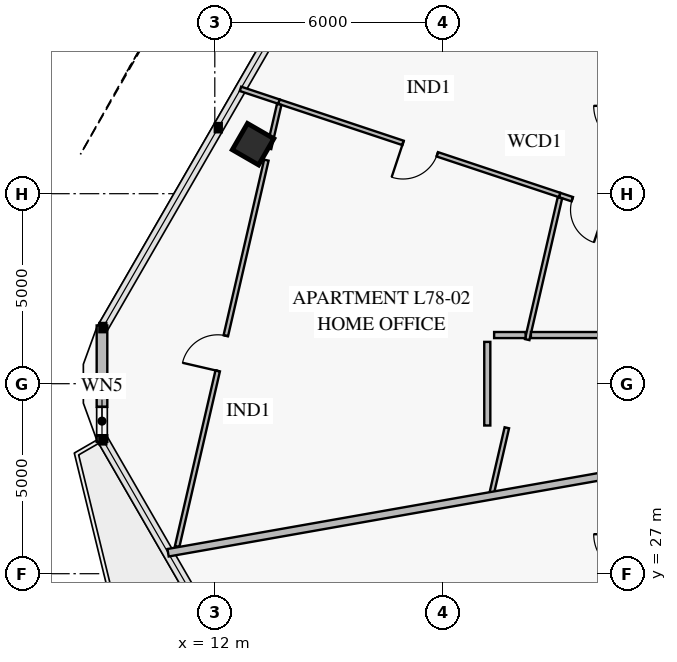
"""IFC4 building model, lengths in metres.
Left out: names, types, materials, properties, quantities, classifications, styles, units other than length and angle.
Written with IfcOpenShell. Run it as: python <this file> out.ifc"""

import sys

from ifc_helpers import new_model, si_unit, direction, frame, frame_2d, origin, origin_2d, place, context, subcontext, project, spatial, rectangle, extrude, element, fill, save


model = new_model("IFC4")
c1 = context("Model", 3, precision=1e-05, world=origin(), true_north=direction((0.0, 1.0)))
c2 = subcontext(c1, "Body", "Model", "MODEL_VIEW")
j1 = project(units=[si_unit("LENGTHUNIT", "METRE"), si_unit("PLANEANGLEUNIT", "RADIAN")], contexts=[c1])
p1 = place(None, origin())
s1 = spatial("IfcSite", under=j1, at=p1, CompositionType="ELEMENT")
p2 = place(p1, origin())
s2 = spatial("IfcBuilding", under=s1, at=p2, CompositionType="ELEMENT")
p3 = place(p2, frame((0.0, 0.0, 308.2)))
s3 = spatial("IfcBuildingStorey", under=s2, at=p3, CompositionType="ELEMENT", Elevation=308.2)
p4 = place(p3, frame((13.007, 38.302, 0.0), z_axis=(0.0, 0.0, 1.0), x_axis=(-0.5, -0.866025403784, 0.0)))
e1 = element("IfcColumn", 1, at=p4, inside=s3, PredefinedType="COLUMN", context=c2, shape_type="SweptSolid", body=[
    extrude(rectangle(XDim=0.8, YDim=0.8, at=origin_2d()), origin(), (0.0, 0.0, 1.0), 3.55),
])
p5 = place(p3, frame((9.031, 30.468, 0.0), z_axis=(0.0, 0.0, 1.0), x_axis=(0.0, 1.0, 0.0)))
e2 = element("IfcWall", 2, at=p5, inside=s3, PredefinedType="SOLIDWALL", context=c2, shape_type="SweptSolid", body=[
    extrude(rectangle(XDim=3.065, YDim=0.28, at=frame_2d((1.532, 0.0))), origin(), (0.0, 0.0, 1.0), 3.55),
])
p6 = place(p5, frame((0.173, 0.0, 0.85)))
e3 = element("IfcOpeningElement", 3, at=p6, cuts=e2, PredefinedType="OPENING", context=c2, shape_type="SweptSolid", body=[
    extrude(rectangle(XDim=0.75, YDim=1.5, at=frame_2d((0.375, 0.75))), frame((0.0, 0.152, 0.0), z_axis=(0.0, -1.0, 0.0), x_axis=(1.0, 0.0, 0.0)), (0.0, 0.0, 1.0), 0.304),
])
p7 = place(p3, frame((22.45, 36.508, 0.0), z_axis=(0.0, 0.0, 1.0), x_axis=(-0.94886823131, 0.315672424532, 0.0)))
e4 = element("IfcWall", 4, at=p7, inside=s3, PredefinedType="PARTITIONING", context=c2, shape_type="SweptSolid", body=[
    extrude(rectangle(XDim=1.451, YDim=0.12, at=frame_2d((0.726, 0.0))), origin(), (0.0, 0.0, 1.0), 3.55),
])
p8 = place(p7, frame((0.2, 0.0, 0.0)))
e5 = element("IfcOpeningElement", 5, at=p8, cuts=e4, PredefinedType="OPENING", context=c2, shape_type="SweptSolid", body=[
    extrude(rectangle(XDim=0.9, YDim=2.1, at=frame_2d((0.45, 1.05))), frame((0.0, 0.072, 0.0), z_axis=(0.0, -1.0, 0.0), x_axis=(1.0, 0.0, 0.0)), (0.0, 0.0, 1.0), 0.144),
])
p9 = place(p3, frame((21.073, 36.966, 0.0), z_axis=(0.0, 0.0, 1.0), x_axis=(-0.948883822728, 0.315625554995, 0.0)))
e6 = element("IfcWall", 6, at=p9, inside=s3, PredefinedType="PARTITIONING", context=c2, shape_type="SweptSolid", body=[
    extrude(rectangle(XDim=7.785, YDim=0.12, at=frame_2d((3.892, 0.0))), origin(), (0.0, 0.0, 1.0), 2.97),
])
p10 = place(p9, frame((3.392, 0.0, 0.0)))
e7 = element("IfcOpeningElement", 7, at=p10, cuts=e6, PredefinedType="OPENING", context=c2, shape_type="SweptSolid", body=[
    extrude(rectangle(XDim=0.95, YDim=2.1, at=frame_2d((0.475, 1.05))), frame((0.0, 0.072, 0.0), z_axis=(0.0, -1.0, 0.0), x_axis=(1.0, 0.0, 0.0)), (0.0, 0.0, 1.0), 0.144),
])
p11 = place(p3, frame((13.356, 37.882, 0.0), z_axis=(0.0, 0.0, 1.0), x_axis=(-0.224948374829, -0.974370683396, 0.0)))
e8 = element("IfcWall", 8, at=p11, inside=s3, PredefinedType="PARTITIONING", context=c2, shape_type="SweptSolid", body=[
    extrude(rectangle(XDim=10.433, YDim=0.12, at=frame_2d((5.217, 0.0))), origin(), (0.0, 0.0, 1.0), 2.97),
])
p12 = place(p11, frame((4.742, 0.0, 0.0)))
e9 = element("IfcOpeningElement", 9, at=p12, cuts=e8, PredefinedType="OPENING", context=c2, shape_type="SweptSolid", body=[
    extrude(rectangle(XDim=0.95, YDim=2.1, at=frame_2d((0.475, 1.05))), frame((0.0, 0.072, 0.0), z_axis=(0.0, -1.0, 0.0), x_axis=(1.0, 0.0, 0.0)), (0.0, 0.0, 1.0), 0.144),
])
p13 = place(p3, frame((13.687, 39.423, 0.0), z_axis=(0.0, 0.0, 1.0), x_axis=(-0.948843569766, 0.315746544105, 0.0)))
e10 = element("IfcWall", 10, at=p13, inside=s3, PredefinedType="PARTITIONING", context=c2, shape_type="SweptSolid", body=[
    extrude(rectangle(XDim=1.065, YDim=0.12, at=frame_2d((0.533, 0.0))), origin(), (0.0, 0.0, 1.0), 2.97),
])
p14 = place(p3, frame((21.082, 36.891, 0.0), z_axis=(0.0, 0.0, 1.0), x_axis=(-0.224929350613, -0.974375075232, 0.0)))
e11 = element("IfcWall", 11, at=p14, inside=s3, PredefinedType="PARTITIONING", context=c2, shape_type="SweptSolid", body=[
    extrude(rectangle(XDim=3.829, YDim=0.12, at=frame_2d((1.915, 0.0))), origin(), (0.0, 0.0, 1.0), 3.0),
])
p15 = place(p3, frame((19.685, 30.84, 0.0), z_axis=(0.0, 0.0, 1.0), x_axis=(-0.22491945774, -0.974377358896, 0.0)))
e12 = element("IfcWall", 12, at=p15, inside=s3, PredefinedType="PARTITIONING", context=c2, shape_type="SweptSolid", body=[
    extrude(rectangle(XDim=1.784, YDim=0.12, at=frame_2d((0.892, 0.0))), origin(), (0.0, 0.0, 1.0), 3.55),
])
p16 = place(p3, frame((13.695, 39.348, 0.0), z_axis=(0.0, 0.0, 1.0), x_axis=(-0.225009033114, -0.974356677515, 0.0)))
e13 = element("IfcWall", 13, at=p16, inside=s3, PredefinedType="PARTITIONING", context=c2, shape_type="SweptSolid", body=[
    extrude(rectangle(XDim=1.192, YDim=0.12, at=frame_2d((0.596, 0.0))), origin(), (0.0, 0.0, 1.0), 2.97),
])
p17 = place(p3, frame((23.06, 29.718, 0.0), z_axis=(0.0, 0.0, 1.0), x_axis=(-0.984808757343, -0.173642481728, 0.0)))
e14 = element("IfcWall", 14, at=p17, inside=s3, PredefinedType="PARTITIONING", context=c2, shape_type="SweptSolid", body=[
    extrude(rectangle(XDim=12.48, YDim=0.2, at=frame_2d((6.24, 0.0))), origin(), (0.0, 0.0, 1.0), 2.97),
])
p18 = place(p3, frame((22.932, 33.28, 0.0), z_axis=(0.0, 0.0, 1.0), x_axis=(-1.0, 0.0, 0.0)))
e15 = element("IfcWall", 15, at=p18, inside=s3, PredefinedType="PARTITIONING", context=c2, shape_type="SweptSolid", body=[
    extrude(rectangle(XDim=2.614, YDim=0.16, at=frame_2d((1.307, 0.0))), origin(), (0.0, 0.0, 1.0), 3.55),
])
p19 = place(p3, frame((19.17, 33.1, 0.0), z_axis=(0.0, 0.0, 1.0), x_axis=(0.0, -1.0, 0.0)))
e16 = element("IfcWall", 16, at=p19, inside=s3, PredefinedType="PARTITIONING", context=c2, shape_type="SweptSolid", body=[
    extrude(rectangle(XDim=2.2, YDim=0.16, at=frame_2d((1.1, 0.0))), origin(), (0.0, 0.0, 1.0), 3.55),
])
p20 = place(p3, frame((20.178, 33.28, 0.0), z_axis=(0.0, 0.0, 1.0), x_axis=(-1.0, 0.0, 0.0)))
e17 = element("IfcWall", 17, at=p20, inside=s3, PredefinedType="PARTITIONING", context=c2, shape_type="SweptSolid", body=[
    extrude(rectangle(XDim=0.828, YDim=0.16, at=frame_2d((0.414, 0.0))), origin(), (0.0, 0.0, 1.0), 3.55),
])
p21 = place(p6, origin())
e18 = element("IfcWindow", 18, at=p21, inside=s3, PartitioningType="SINGLE_PANEL", PredefinedType="WINDOW", context=c2, shape_type="SweptSolid", body=[
    extrude(rectangle(XDim=0.75, YDim=1.5, at=frame_2d((0.375, 0.75))), frame((0.0, 0.03, 0.0), z_axis=(0.0, -1.0, 0.0), x_axis=(1.0, 0.0, 0.0)), (0.0, 0.0, 1.0), 0.06),
])
fill(e3, e18)
p22 = place(p8, origin())
e19 = element("IfcDoor", 19, at=p22, inside=s3, OperationType="SINGLE_SWING_LEFT", PredefinedType="DOOR", context=c2, shape_type="SweptSolid", body=[
    extrude(rectangle(XDim=0.9, YDim=2.1, at=frame_2d((0.45, 1.05))), frame((0.0, 0.025, 0.0), z_axis=(0.0, -1.0, 0.0), x_axis=(1.0, 0.0, 0.0)), (0.0, 0.0, 1.0), 0.05),
])
fill(e5, e19)
p23 = place(p10, origin())
e20 = element("IfcDoor", 20, at=p23, inside=s3, OperationType="SINGLE_SWING_RIGHT", PredefinedType="DOOR", context=c2, shape_type="SweptSolid", body=[
    extrude(rectangle(XDim=0.95, YDim=2.1, at=frame_2d((0.475, 1.05))), frame((0.0, 0.025, 0.0), z_axis=(0.0, -1.0, 0.0), x_axis=(1.0, 0.0, 0.0)), (0.0, 0.0, 1.0), 0.05),
])
fill(e7, e20)
p24 = place(p12, frame((0.95, 0.0, 0.0), z_axis=(0.0, 0.0, 1.0), x_axis=(-1.0, 0.0, 0.0)))
e21 = element("IfcDoor", 21, at=p24, inside=s3, OperationType="SINGLE_SWING_LEFT", PredefinedType="DOOR", context=c2, shape_type="SweptSolid", body=[
    extrude(rectangle(XDim=0.95, YDim=2.1, at=frame_2d((0.475, 1.05))), frame((0.0, 0.025, 0.0), z_axis=(0.0, -1.0, 0.0), x_axis=(1.0, 0.0, 0.0)), (0.0, 0.0, 1.0), 0.05),
])
fill(e9, e21)
save(model, sys.argv[1])
